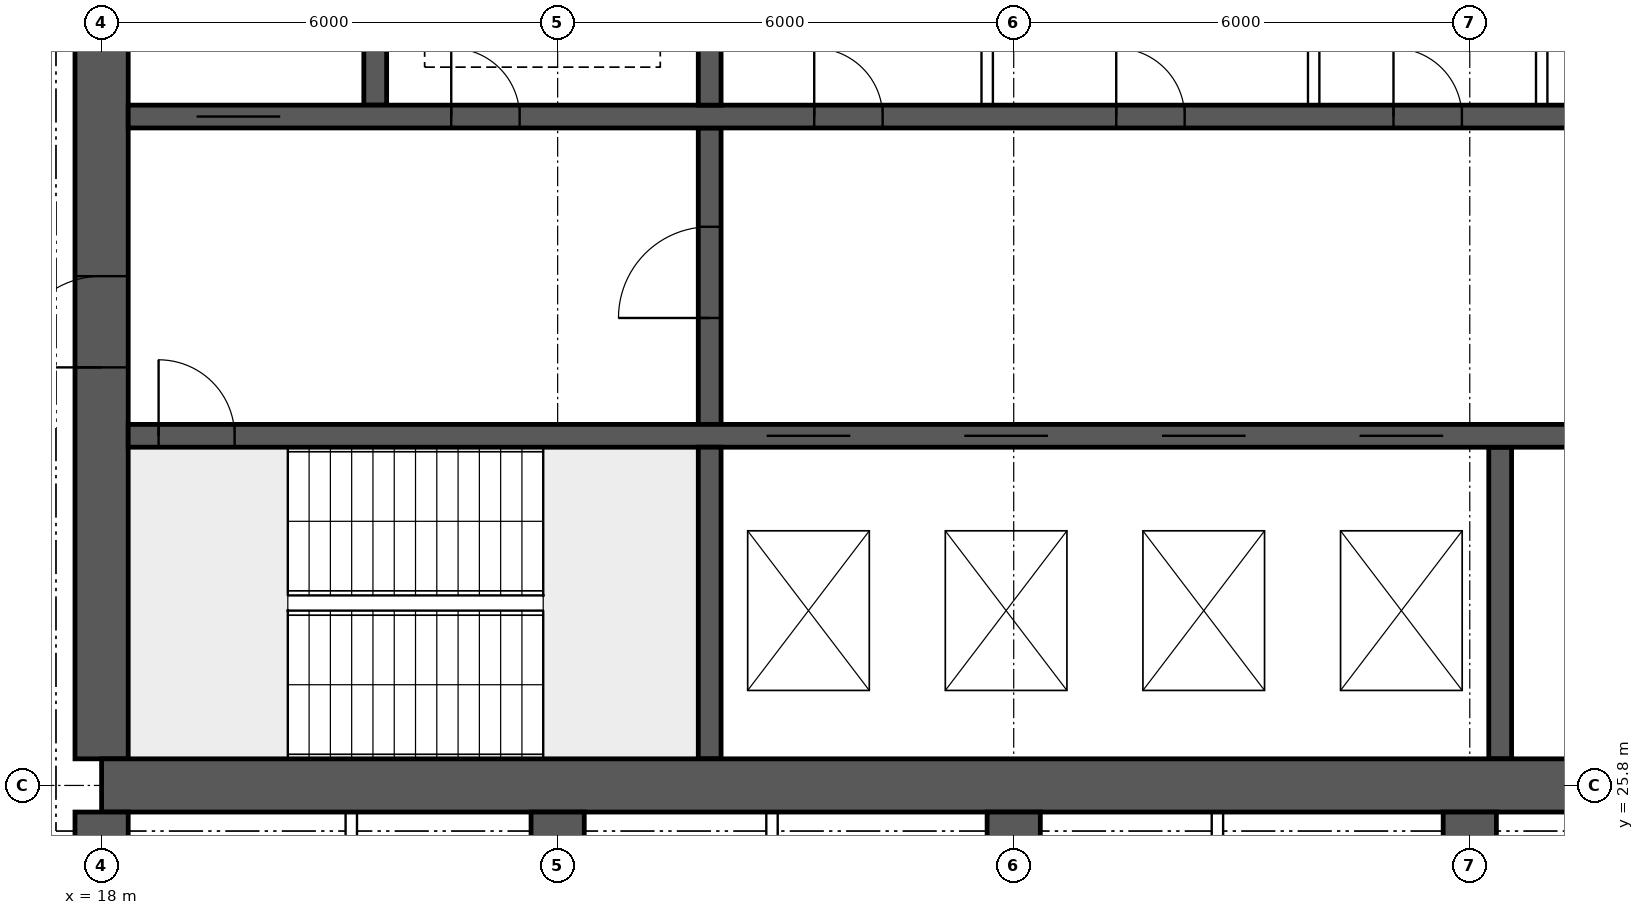
"""IFC4 building model, lengths in metres.
Left out: names, types, materials, properties, quantities, classifications, styles, units other than length and angle.
Written with IfcOpenShell. Run it as: python <this file> out.ifc"""

import sys

from ifc_helpers import new_model, si_unit, direction, frame, frame_2d, origin, place, context, subcontext, project, spatial, rectangle, extrude, element, fill, save


model = new_model("IFC4")
c1 = context("Model", 3, precision=1e-05, world=origin(), true_north=direction((0.0, 1.0)))
c2 = subcontext(c1, "Body", "Model", "MODEL_VIEW")
j1 = project(units=[si_unit("LENGTHUNIT", "METRE"), si_unit("PLANEANGLEUNIT", "RADIAN")], contexts=[c1])
p1 = place(None, origin())
s1 = spatial("IfcSite", under=j1, at=p1, CompositionType="ELEMENT")
p2 = place(p1, origin())
s2 = spatial("IfcBuilding", under=s1, at=p2, CompositionType="ELEMENT")
p3 = place(p2, frame((0.0, 0.0, 208.3)))
s3 = spatial("IfcBuildingStorey", under=s2, at=p3, CompositionType="ELEMENT", Elevation=208.3)
p4 = place(p3, frame((18.0, 25.8, 0.0), z_axis=(0.0, 0.0, 1.0), x_axis=(1.0, 0.0, 0.0)))
e1 = element("IfcWall", 1, at=p4, inside=s3, PredefinedType="SHEAR", context=c2, shape_type="SweptSolid", body=[
    extrude(rectangle(XDim=48.0, YDim=0.7, at=frame_2d((24.0, 0.0))), origin(), (0.0, 0.0, 1.0), 4.5),
])
p5 = place(p3, frame((18.0, 26.15, 0.0), z_axis=(0.0, 0.0, 1.0), x_axis=(0.0, 1.0, 0.0)))
e2 = element("IfcWall", 2, at=p5, inside=s3, PredefinedType="SHEAR", context=c2, shape_type="SweptSolid", body=[
    extrude(rectangle(XDim=11.7, YDim=0.7, at=frame_2d((5.85, 0.0))), origin(), (0.0, 0.0, 1.0), 4.5),
])
p6 = place(p5, frame((5.15, 0.0, 0.0)))
e3 = element("IfcOpeningElement", 3, at=p6, cuts=e2, PredefinedType="OPENING", context=c2, shape_type="SweptSolid", body=[
    extrude(rectangle(XDim=1.2, YDim=2.1, at=frame_2d((0.6, 1.05))), frame((0.0, 0.36, 0.0), z_axis=(0.0, -1.0, 0.0), x_axis=(1.0, 0.0, 0.0)), (0.0, 0.0, 1.0), 0.72),
])
p7 = place(p3, frame((18.35, 30.4, 0.0), z_axis=(0.0, 0.0, 1.0), x_axis=(1.0, 0.0, 0.0)))
e4 = element("IfcWall", 4, at=p7, inside=s3, PredefinedType="SHEAR", context=c2, shape_type="SweptSolid", body=[
    extrude(rectangle(XDim=47.3, YDim=0.3, at=frame_2d((23.65, 0.0))), origin(), (0.0, 0.0, 1.0), 4.5),
])
p8 = place(p7, frame((0.4, 0.0, 0.0)))
e5 = element("IfcOpeningElement", 5, at=p8, cuts=e4, PredefinedType="OPENING", context=c2, shape_type="SweptSolid", body=[
    extrude(rectangle(XDim=1.0, YDim=2.1, at=frame_2d((0.5, 1.05))), frame((0.0, 0.16, 0.0), z_axis=(0.0, -1.0, 0.0), x_axis=(1.0, 0.0, 0.0)), (0.0, 0.0, 1.0), 0.32),
])
p9 = place(p7, frame((45.9, 0.0, 0.0)))
e6 = element("IfcOpeningElement", 6, at=p9, cuts=e4, PredefinedType="OPENING", context=c2, shape_type="SweptSolid", body=[
    extrude(rectangle(XDim=1.0, YDim=2.1, at=frame_2d((0.5, 1.05))), frame((0.0, 0.16, 0.0), z_axis=(0.0, -1.0, 0.0), x_axis=(1.0, 0.0, 0.0)), (0.0, 0.0, 1.0), 0.32),
])
p10 = place(p7, frame((8.4, 0.0, 0.0)))
e7 = element("IfcOpeningElement", 7, at=p10, cuts=e4, PredefinedType="OPENING", context=c2, shape_type="SweptSolid", body=[
    extrude(rectangle(XDim=1.1, YDim=2.1, at=frame_2d((0.55, 1.05))), frame((0.0, 0.16, 0.0), z_axis=(0.0, -1.0, 0.0), x_axis=(1.0, 0.0, 0.0)), (0.0, 0.0, 1.0), 0.32),
])
p11 = place(p7, frame((11.0, 0.0, 0.0)))
e8 = element("IfcOpeningElement", 8, at=p11, cuts=e4, PredefinedType="OPENING", context=c2, shape_type="SweptSolid", body=[
    extrude(rectangle(XDim=1.1, YDim=2.1, at=frame_2d((0.55, 1.05))), frame((0.0, 0.16, 0.0), z_axis=(0.0, -1.0, 0.0), x_axis=(1.0, 0.0, 0.0)), (0.0, 0.0, 1.0), 0.32),
])
p12 = place(p7, frame((13.6, 0.0, 0.0)))
e9 = element("IfcOpeningElement", 9, at=p12, cuts=e4, PredefinedType="OPENING", context=c2, shape_type="SweptSolid", body=[
    extrude(rectangle(XDim=1.1, YDim=2.1, at=frame_2d((0.55, 1.05))), frame((0.0, 0.16, 0.0), z_axis=(0.0, -1.0, 0.0), x_axis=(1.0, 0.0, 0.0)), (0.0, 0.0, 1.0), 0.32),
])
p13 = place(p7, frame((16.2, 0.0, 0.0)))
e10 = element("IfcOpeningElement", 10, at=p13, cuts=e4, PredefinedType="OPENING", context=c2, shape_type="SweptSolid", body=[
    extrude(rectangle(XDim=1.1, YDim=2.1, at=frame_2d((0.55, 1.05))), frame((0.0, 0.16, 0.0), z_axis=(0.0, -1.0, 0.0), x_axis=(1.0, 0.0, 0.0)), (0.0, 0.0, 1.0), 0.32),
])
p14 = place(p7, frame((18.975, 0.0, 0.0)))
e11 = element("IfcOpeningElement", 11, at=p14, cuts=e4, PredefinedType="OPENING", context=c2, shape_type="SweptSolid", body=[
    extrude(rectangle(XDim=0.9, YDim=2.1, at=frame_2d((0.45, 1.05))), frame((0.0, 0.16, 0.0), z_axis=(0.0, -1.0, 0.0), x_axis=(1.0, 0.0, 0.0)), (0.0, 0.0, 1.0), 0.32),
])
p15 = place(p7, frame((24.375, 0.0, 0.0)))
e12 = element("IfcOpeningElement", 12, at=p15, cuts=e4, PredefinedType="OPENING", context=c2, shape_type="SweptSolid", body=[
    extrude(rectangle(XDim=1.1, YDim=2.1, at=frame_2d((0.55, 1.05))), frame((0.0, 0.16, 0.0), z_axis=(0.0, -1.0, 0.0), x_axis=(1.0, 0.0, 0.0)), (0.0, 0.0, 1.0), 0.32),
])
p16 = place(p7, frame((27.125, 0.0, 0.0)))
e13 = element("IfcOpeningElement", 13, at=p16, cuts=e4, PredefinedType="OPENING", context=c2, shape_type="SweptSolid", body=[
    extrude(rectangle(XDim=1.1, YDim=2.1, at=frame_2d((0.55, 1.05))), frame((0.0, 0.16, 0.0), z_axis=(0.0, -1.0, 0.0), x_axis=(1.0, 0.0, 0.0)), (0.0, 0.0, 1.0), 0.32),
])
p17 = place(p7, frame((30.267, 0.0, 0.0)))
e14 = element("IfcOpeningElement", 14, at=p17, cuts=e4, PredefinedType="OPENING", context=c2, shape_type="SweptSolid", body=[
    extrude(rectangle(XDim=1.1, YDim=2.1, at=frame_2d((0.55, 1.05))), frame((0.0, 0.16, 0.0), z_axis=(0.0, -1.0, 0.0), x_axis=(1.0, 0.0, 0.0)), (0.0, 0.0, 1.0), 0.32),
])
p18 = place(p7, frame((33.8, 0.0, 0.0)))
e15 = element("IfcOpeningElement", 15, at=p18, cuts=e4, PredefinedType="OPENING", context=c2, shape_type="SweptSolid", body=[
    extrude(rectangle(XDim=1.1, YDim=2.1, at=frame_2d((0.55, 1.05))), frame((0.0, 0.16, 0.0), z_axis=(0.0, -1.0, 0.0), x_axis=(1.0, 0.0, 0.0)), (0.0, 0.0, 1.0), 0.32),
])
p19 = place(p7, frame((37.333, 0.0, 0.0)))
e16 = element("IfcOpeningElement", 16, at=p19, cuts=e4, PredefinedType="OPENING", context=c2, shape_type="SweptSolid", body=[
    extrude(rectangle(XDim=1.1, YDim=2.1, at=frame_2d((0.55, 1.05))), frame((0.0, 0.16, 0.0), z_axis=(0.0, -1.0, 0.0), x_axis=(1.0, 0.0, 0.0)), (0.0, 0.0, 1.0), 0.32),
])
p20 = place(p3, frame((18.35, 34.6, 0.0), z_axis=(0.0, 0.0, 1.0), x_axis=(1.0, 0.0, 0.0)))
e17 = element("IfcWall", 17, at=p20, inside=s3, PredefinedType="SHEAR", context=c2, shape_type="SweptSolid", body=[
    extrude(rectangle(XDim=47.3, YDim=0.3, at=frame_2d((23.65, 0.0))), origin(), (0.0, 0.0, 1.0), 4.5),
])
p21 = place(p20, frame((0.9, 0.0, 0.0)))
e18 = element("IfcOpeningElement", 18, at=p21, cuts=e17, PredefinedType="OPENING", context=c2, shape_type="SweptSolid", body=[
    extrude(rectangle(XDim=1.1, YDim=2.1, at=frame_2d((0.55, 1.05))), frame((0.0, 0.16, 0.0), z_axis=(0.0, -1.0, 0.0), x_axis=(1.0, 0.0, 0.0)), (0.0, 0.0, 1.0), 0.32),
])
p22 = place(p20, frame((45.3, 0.0, 0.0)))
e19 = element("IfcOpeningElement", 19, at=p22, cuts=e17, PredefinedType="OPENING", context=c2, shape_type="SweptSolid", body=[
    extrude(rectangle(XDim=1.1, YDim=2.1, at=frame_2d((0.55, 1.05))), frame((0.0, 0.16, 0.0), z_axis=(0.0, -1.0, 0.0), x_axis=(1.0, 0.0, 0.0)), (0.0, 0.0, 1.0), 0.32),
])
p23 = place(p20, frame((4.25, 0.0, 0.0)))
e20 = element("IfcOpeningElement", 20, at=p23, cuts=e17, PredefinedType="OPENING", context=c2, shape_type="SweptSolid", body=[
    extrude(rectangle(XDim=0.9, YDim=2.1, at=frame_2d((0.45, 1.05))), frame((0.0, 0.16, 0.0), z_axis=(0.0, -1.0, 0.0), x_axis=(1.0, 0.0, 0.0)), (0.0, 0.0, 1.0), 0.32),
])
p24 = place(p20, frame((42.15, 0.0, 0.0)))
e21 = element("IfcOpeningElement", 21, at=p24, cuts=e17, PredefinedType="OPENING", context=c2, shape_type="SweptSolid", body=[
    extrude(rectangle(XDim=0.9, YDim=2.1, at=frame_2d((0.45, 1.05))), frame((0.0, 0.16, 0.0), z_axis=(0.0, -1.0, 0.0), x_axis=(1.0, 0.0, 0.0)), (0.0, 0.0, 1.0), 0.32),
])
p25 = place(p20, frame((9.025, 0.0, 0.0)))
e22 = element("IfcOpeningElement", 22, at=p25, cuts=e17, PredefinedType="OPENING", context=c2, shape_type="SweptSolid", body=[
    extrude(rectangle(XDim=0.9, YDim=2.1, at=frame_2d((0.45, 1.05))), frame((0.0, 0.16, 0.0), z_axis=(0.0, -1.0, 0.0), x_axis=(1.0, 0.0, 0.0)), (0.0, 0.0, 1.0), 0.32),
])
p26 = place(p20, frame((12.999, 0.0, 0.0)))
e23 = element("IfcOpeningElement", 23, at=p26, cuts=e17, PredefinedType="OPENING", context=c2, shape_type="SweptSolid", body=[
    extrude(rectangle(XDim=0.9, YDim=2.1, at=frame_2d((0.45, 1.05))), frame((0.0, 0.16, 0.0), z_axis=(0.0, -1.0, 0.0), x_axis=(1.0, 0.0, 0.0)), (0.0, 0.0, 1.0), 0.32),
])
p27 = place(p20, frame((16.646, 0.0, 0.0)))
e24 = element("IfcOpeningElement", 24, at=p27, cuts=e17, PredefinedType="OPENING", context=c2, shape_type="SweptSolid", body=[
    extrude(rectangle(XDim=0.9, YDim=2.1, at=frame_2d((0.45, 1.05))), frame((0.0, 0.16, 0.0), z_axis=(0.0, -1.0, 0.0), x_axis=(1.0, 0.0, 0.0)), (0.0, 0.0, 1.0), 0.32),
])
p28 = place(p20, frame((20.405, 0.0, 0.0)))
e25 = element("IfcOpeningElement", 25, at=p28, cuts=e17, PredefinedType="OPENING", context=c2, shape_type="SweptSolid", body=[
    extrude(rectangle(XDim=0.9, YDim=2.1, at=frame_2d((0.45, 1.05))), frame((0.0, 0.16, 0.0), z_axis=(0.0, -1.0, 0.0), x_axis=(1.0, 0.0, 0.0)), (0.0, 0.0, 1.0), 0.32),
])
p29 = place(p20, frame((24.811, 0.0, 0.0)))
e26 = element("IfcOpeningElement", 26, at=p29, cuts=e17, PredefinedType="OPENING", context=c2, shape_type="SweptSolid", body=[
    extrude(rectangle(XDim=0.9, YDim=2.1, at=frame_2d((0.45, 1.05))), frame((0.0, 0.16, 0.0), z_axis=(0.0, -1.0, 0.0), x_axis=(1.0, 0.0, 0.0)), (0.0, 0.0, 1.0), 0.32),
])
p30 = place(p20, frame((27.608, 0.0, 0.0)))
e27 = element("IfcOpeningElement", 27, at=p30, cuts=e17, PredefinedType="OPENING", context=c2, shape_type="SweptSolid", body=[
    extrude(rectangle(XDim=0.9, YDim=2.1, at=frame_2d((0.45, 1.05))), frame((0.0, 0.16, 0.0), z_axis=(0.0, -1.0, 0.0), x_axis=(1.0, 0.0, 0.0)), (0.0, 0.0, 1.0), 0.32),
])
p31 = place(p20, frame((29.981, 0.0, 0.0)))
e28 = element("IfcOpeningElement", 28, at=p31, cuts=e17, PredefinedType="OPENING", context=c2, shape_type="SweptSolid", body=[
    extrude(rectangle(XDim=0.9, YDim=2.1, at=frame_2d((0.45, 1.05))), frame((0.0, 0.16, 0.0), z_axis=(0.0, -1.0, 0.0), x_axis=(1.0, 0.0, 0.0)), (0.0, 0.0, 1.0), 0.32),
])
p32 = place(p20, frame((35.451, 0.0, 0.0)))
e29 = element("IfcOpeningElement", 29, at=p32, cuts=e17, PredefinedType="OPENING", context=c2, shape_type="SweptSolid", body=[
    extrude(rectangle(XDim=0.9, YDim=2.1, at=frame_2d((0.45, 1.05))), frame((0.0, 0.16, 0.0), z_axis=(0.0, -1.0, 0.0), x_axis=(1.0, 0.0, 0.0)), (0.0, 0.0, 1.0), 0.32),
])
p33 = place(p3, frame((26.0, 26.15, 0.0), z_axis=(0.0, 0.0, 1.0), x_axis=(0.0, 1.0, 0.0)))
e30 = element("IfcWall", 30, at=p33, inside=s3, PredefinedType="SHEAR", context=c2, shape_type="SweptSolid", body=[
    extrude(rectangle(XDim=4.1, YDim=0.3, at=frame_2d((2.05, 0.0))), origin(), (0.0, 0.0, 1.0), 4.5),
])
p34 = place(p3, frame((26.0, 30.55, 0.0), z_axis=(0.0, 0.0, 1.0), x_axis=(0.0, 1.0, 0.0)))
e31 = element("IfcWall", 31, at=p34, inside=s3, PredefinedType="SHEAR", context=c2, shape_type="SweptSolid", body=[
    extrude(rectangle(XDim=3.9, YDim=0.3, at=frame_2d((1.95, 0.0))), origin(), (0.0, 0.0, 1.0), 4.5),
])
p35 = place(p34, frame((1.4, 0.0, 0.0)))
e32 = element("IfcOpeningElement", 32, at=p35, cuts=e31, PredefinedType="OPENING", context=c2, shape_type="SweptSolid", body=[
    extrude(rectangle(XDim=1.2, YDim=2.1, at=frame_2d((0.6, 1.05))), frame((0.0, 0.16, 0.0), z_axis=(0.0, -1.0, 0.0), x_axis=(1.0, 0.0, 0.0)), (0.0, 0.0, 1.0), 0.32),
])
for number, where, z_axis, x_axis in (
    (33, (21.6, 34.75, 0.0), (0.0, 0.0, 1.0), (0.0, 1.0, 0.0)),
    (34, (26.0, 34.75, 0.0), (0.0, 0.0, 1.0), (0.0, 1.0, 0.0)),
):
    element("IfcWall", number, at=place(p3, frame(where, z_axis=z_axis, x_axis=x_axis)), inside=s3, PredefinedType="SHEAR", context=c2, shape_type="SweptSolid", body=[
        extrude(rectangle(XDim=3.1, YDim=0.3, at=frame_2d((1.55, 0.0))), origin(), (0.0, 0.0, 1.0), 4.5),
    ])
p36 = place(p3, frame((36.4, 26.15, 0.0), z_axis=(0.0, 0.0, 1.0), x_axis=(0.0, 1.0, 0.0)))
e35 = element("IfcWall", 35, at=p36, inside=s3, PredefinedType="SHEAR", context=c2, shape_type="SweptSolid", body=[
    extrude(rectangle(XDim=4.1, YDim=0.3, at=frame_2d((2.05, 0.0))), origin(), (0.0, 0.0, 1.0), 4.5),
])
for number, where, z_axis, x_axis in (
    (36, (18.0, 18.4, 0.0), (0.0, 0.0, 1.0), (0.0, 1.0, 0.0)),
    (37, (24.0, 18.4, 0.0), (0.0, 0.0, 1.0), (0.0, 1.0, 0.0)),
    (38, (30.0, 18.4, 0.0), (0.0, 0.0, 1.0), (0.0, 1.0, 0.0)),
    (39, (36.0, 18.4, 0.0), (0.0, 0.0, 1.0), (0.0, 1.0, 0.0)),
):
    element("IfcWall", number, at=place(p3, frame(where, z_axis=z_axis, x_axis=x_axis)), inside=s3, PredefinedType="SHEAR", context=c2, shape_type="SweptSolid", body=[
        extrude(rectangle(XDim=7.05, YDim=0.7, at=frame_2d((3.525, 0.0))), origin(), (0.0, 0.0, 1.0), 4.5),
    ])
for number, where, z_axis, x_axis in (
    (40, (29.651, 34.75, 0.0), (0.0, 0.0, 1.0), (0.0, 1.0, 0.0)),
    (41, (33.946, 34.75, 0.0), (0.0, 0.0, 1.0), (0.0, 1.0, 0.0)),
    (42, (36.946, 34.75, 0.0), (0.0, 0.0, 1.0), (0.0, 1.0, 0.0)),
):
    element("IfcWall", number, at=place(p3, frame(where, z_axis=z_axis, x_axis=x_axis)), inside=s3, PredefinedType="SOLIDWALL", context=c2, shape_type="SweptSolid", body=[
        extrude(rectangle(XDim=3.1, YDim=0.15, at=frame_2d((1.55, 0.0))), origin(), (0.0, 0.0, 1.0), 4.25),
    ])
for number, where, z_axis, x_axis in (
    (43, (21.285, 18.5, 0.0), (0.0, 0.0, 1.0), (0.0, 1.0, 0.0)),
    (44, (26.82, 18.5, 0.0), (0.0, 0.0, 1.0), (0.0, 1.0, 0.0)),
    (45, (32.68, 18.5, 0.0), (0.0, 0.0, 1.0), (0.0, 1.0, 0.0)),
):
    element("IfcWall", number, at=place(p3, frame(where, z_axis=z_axis, x_axis=x_axis)), inside=s3, PredefinedType="PARTITIONING", context=c2, shape_type="SweptSolid", body=[
        extrude(rectangle(XDim=6.95, YDim=0.15, at=frame_2d((3.475, 0.0))), origin(), (0.0, 0.0, 1.0), 4.25),
    ])
p37 = place(p6, origin())
e46 = element("IfcDoor", 46, at=p37, inside=s3, OperationType="SINGLE_SWING_LEFT", PredefinedType="DOOR", context=c2, shape_type="SweptSolid", body=[
    extrude(rectangle(XDim=1.2, YDim=2.1, at=frame_2d((0.6, 1.05))), frame((0.0, 0.025, 0.0), z_axis=(0.0, -1.0, 0.0), x_axis=(1.0, 0.0, 0.0)), (0.0, 0.0, 1.0), 0.05),
])
fill(e3, e46)
p38 = place(p8, origin())
e47 = element("IfcDoor", 47, at=p38, inside=s3, OperationType="SINGLE_SWING_LEFT", PredefinedType="DOOR", context=c2, shape_type="SweptSolid", body=[
    extrude(rectangle(XDim=1.0, YDim=2.1, at=frame_2d((0.5, 1.05))), frame((0.0, 0.025, 0.0), z_axis=(0.0, -1.0, 0.0), x_axis=(1.0, 0.0, 0.0)), (0.0, 0.0, 1.0), 0.05),
])
fill(e5, e47)
p39 = place(p21, origin())
e48 = element("IfcDoor", 48, at=p39, inside=s3, OperationType="DOUBLE_DOOR_SLIDING", PredefinedType="DOOR", context=c2, shape_type="SweptSolid", body=[
    extrude(rectangle(XDim=1.1, YDim=2.1, at=frame_2d((0.55, 1.05))), frame((0.0, 0.025, 0.0), z_axis=(0.0, -1.0, 0.0), x_axis=(1.0, 0.0, 0.0)), (0.0, 0.0, 1.0), 0.05),
])
fill(e18, e48)
p40 = place(p23, origin())
e49 = element("IfcDoor", 49, at=p40, inside=s3, OperationType="SINGLE_SWING_LEFT", PredefinedType="DOOR", context=c2, shape_type="SweptSolid", body=[
    extrude(rectangle(XDim=0.9, YDim=2.1, at=frame_2d((0.45, 1.05))), frame((0.0, 0.025, 0.0), z_axis=(0.0, -1.0, 0.0), x_axis=(1.0, 0.0, 0.0)), (0.0, 0.0, 1.0), 0.05),
])
fill(e20, e49)
p41 = place(p35, origin())
e50 = element("IfcDoor", 50, at=p41, inside=s3, OperationType="SINGLE_SWING_LEFT", PredefinedType="DOOR", context=c2, shape_type="SweptSolid", body=[
    extrude(rectangle(XDim=1.2, YDim=2.1, at=frame_2d((0.6, 1.05))), frame((0.0, 0.025, 0.0), z_axis=(0.0, -1.0, 0.0), x_axis=(1.0, 0.0, 0.0)), (0.0, 0.0, 1.0), 0.05),
])
fill(e32, e50)
p42 = place(p25, origin())
e51 = element("IfcDoor", 51, at=p42, inside=s3, OperationType="SINGLE_SWING_LEFT", PredefinedType="DOOR", context=c2, shape_type="SweptSolid", body=[
    extrude(rectangle(XDim=0.9, YDim=2.1, at=frame_2d((0.45, 1.05))), frame((0.0, 0.025, 0.0), z_axis=(0.0, -1.0, 0.0), x_axis=(1.0, 0.0, 0.0)), (0.0, 0.0, 1.0), 0.05),
])
fill(e22, e51)
p43 = place(p26, origin())
e52 = element("IfcDoor", 52, at=p43, inside=s3, OperationType="SINGLE_SWING_LEFT", PredefinedType="DOOR", context=c2, shape_type="SweptSolid", body=[
    extrude(rectangle(XDim=0.9, YDim=2.1, at=frame_2d((0.45, 1.05))), frame((0.0, 0.025, 0.0), z_axis=(0.0, -1.0, 0.0), x_axis=(1.0, 0.0, 0.0)), (0.0, 0.0, 1.0), 0.05),
])
fill(e23, e52)
p44 = place(p27, origin())
e53 = element("IfcDoor", 53, at=p44, inside=s3, OperationType="SINGLE_SWING_LEFT", PredefinedType="DOOR", context=c2, shape_type="SweptSolid", body=[
    extrude(rectangle(XDim=0.9, YDim=2.1, at=frame_2d((0.45, 1.05))), frame((0.0, 0.025, 0.0), z_axis=(0.0, -1.0, 0.0), x_axis=(1.0, 0.0, 0.0)), (0.0, 0.0, 1.0), 0.05),
])
fill(e24, e53)
p45 = place(p10, origin())
e54 = element("IfcDoor", 54, at=p45, inside=s3, OperationType="DOUBLE_DOOR_SLIDING", PredefinedType="DOOR", context=c2, shape_type="SweptSolid", body=[
    extrude(rectangle(XDim=1.1, YDim=2.1, at=frame_2d((0.55, 1.05))), frame((0.0, 0.025, 0.0), z_axis=(0.0, -1.0, 0.0), x_axis=(1.0, 0.0, 0.0)), (0.0, 0.0, 1.0), 0.05),
])
fill(e7, e54)
p46 = place(p11, origin())
e55 = element("IfcDoor", 55, at=p46, inside=s3, OperationType="DOUBLE_DOOR_SLIDING", PredefinedType="DOOR", context=c2, shape_type="SweptSolid", body=[
    extrude(rectangle(XDim=1.1, YDim=2.1, at=frame_2d((0.55, 1.05))), frame((0.0, 0.025, 0.0), z_axis=(0.0, -1.0, 0.0), x_axis=(1.0, 0.0, 0.0)), (0.0, 0.0, 1.0), 0.05),
])
fill(e8, e55)
p47 = place(p12, origin())
e56 = element("IfcDoor", 56, at=p47, inside=s3, OperationType="DOUBLE_DOOR_SLIDING", PredefinedType="DOOR", context=c2, shape_type="SweptSolid", body=[
    extrude(rectangle(XDim=1.1, YDim=2.1, at=frame_2d((0.55, 1.05))), frame((0.0, 0.025, 0.0), z_axis=(0.0, -1.0, 0.0), x_axis=(1.0, 0.0, 0.0)), (0.0, 0.0, 1.0), 0.05),
])
fill(e9, e56)
p48 = place(p13, origin())
e57 = element("IfcDoor", 57, at=p48, inside=s3, OperationType="DOUBLE_DOOR_SLIDING", PredefinedType="DOOR", context=c2, shape_type="SweptSolid", body=[
    extrude(rectangle(XDim=1.1, YDim=2.1, at=frame_2d((0.55, 1.05))), frame((0.0, 0.025, 0.0), z_axis=(0.0, -1.0, 0.0), x_axis=(1.0, 0.0, 0.0)), (0.0, 0.0, 1.0), 0.05),
])
fill(e10, e57)
save(model, sys.argv[1])
